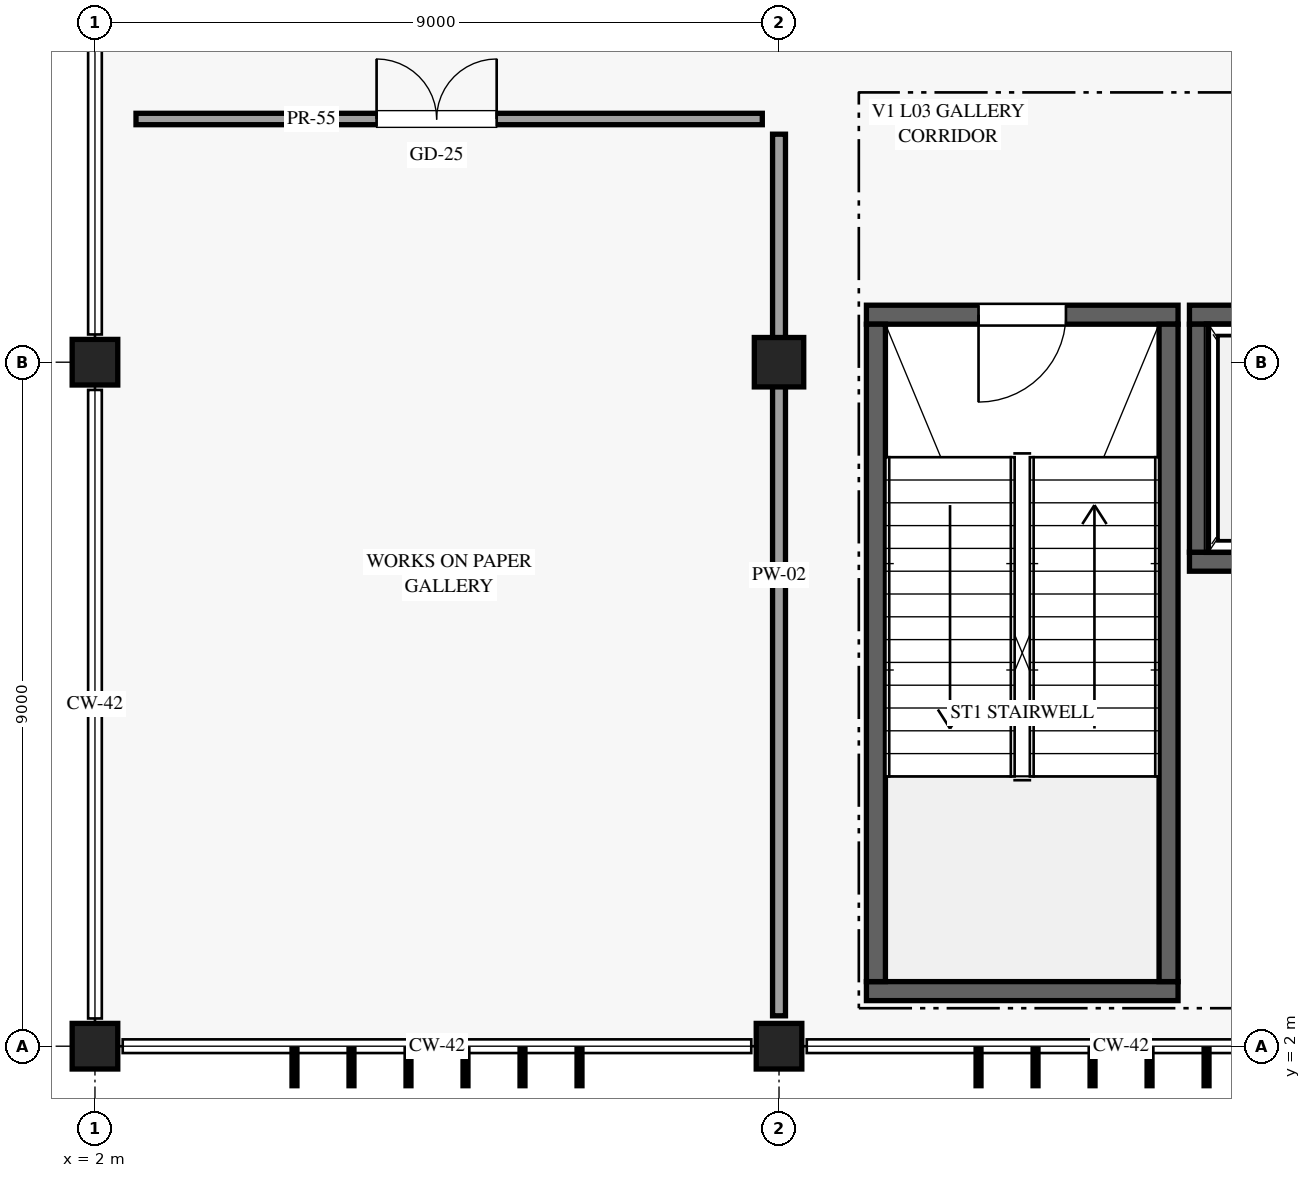
"""IFC4 building model, lengths in metres.
Left out: names, types, materials, properties, quantities, classifications, styles, units other than length and angle.
Written with IfcOpenShell. Run it as: python <this file> out.ifc"""

import sys

from ifc_helpers import new_model, si_unit, direction, frame, frame_2d, origin, origin_2d, place, context, subcontext, project, spatial, rectangle, circle, extrude, element, fill, save


model = new_model("IFC4")
c1 = context("Model", 3, precision=1e-05, world=origin(), true_north=direction((0.0, 1.0)))
c2 = subcontext(c1, "Body", "Model", "MODEL_VIEW")
j1 = project(units=[si_unit("LENGTHUNIT", "METRE"), si_unit("PLANEANGLEUNIT", "RADIAN")], contexts=[c1])
p1 = place(None, origin())
s1 = spatial("IfcSite", under=j1, at=p1, CompositionType="ELEMENT")
p2 = place(p1, origin())
s2 = spatial("IfcBuilding", under=s1, at=p2, CompositionType="ELEMENT")
p3 = place(p2, frame((0.0, 0.0, 15.0)))
s3 = spatial("IfcBuildingStorey", under=s2, at=p3, CompositionType="ELEMENT", Elevation=15.0)
for number, where, z_axis, x_axis in (
    (1, (2.0, 2.0, 0.0), (0.0, 0.0, 1.0), (1.0, 0.0, 0.0)),
    (2, (2.0, 11.0, 0.0), (0.0, 0.0, 1.0), (1.0, 0.0, 0.0)),
    (3, (11.0, 2.0, 0.0), (0.0, 0.0, 1.0), (1.0, 0.0, 0.0)),
):
    element("IfcColumn", number, at=place(p3, frame(where, z_axis=z_axis, x_axis=x_axis)), inside=s3, PredefinedType="COLUMN", context=c2, shape_type="SweptSolid", body=[
        extrude(rectangle(XDim=0.6, YDim=0.6, at=origin_2d()), origin(), (0.0, 0.0, 1.0), 4.5),
    ])
p4 = place(p3, frame((11.0, 11.0, 0.0), z_axis=(0.0, 0.0, 1.0), x_axis=(1.0, 0.0, 0.0)))
e4 = element("IfcColumn", 4, at=p4, inside=s3, PredefinedType="COLUMN", context=c2, shape_type="SweptSolid", body=[
    extrude(circle(Radius=0.325, at=origin_2d()), origin(), (0.0, 0.0, 1.0), 4.5),
])
p5 = place(p3, frame((12.15, 11.625, 0.0), z_axis=(0.0, 0.0, 1.0), x_axis=(1.0, 0.0, 0.0)))
e5 = element("IfcWall", 5, at=p5, inside=s3, PredefinedType="SHEAR", context=c2, shape_type="SweptSolid", body=[
    extrude(rectangle(XDim=4.1, YDim=0.25, at=frame_2d((2.05, 0.0))), origin(), (0.0, 0.0, 1.0), 4.18),
])
p6 = place(p5, frame((2.625, 0.0, 0.0), z_axis=(0.0, 0.0, 1.0), x_axis=(-1.0, 0.0, 0.0)))
e6 = element("IfcOpeningElement", 6, at=p6, cuts=e5, PredefinedType="OPENING", context=c2, shape_type="SweptSolid", body=[
    extrude(rectangle(XDim=1.15, YDim=2.2, at=frame_2d((0.575, 1.1))), frame((0.0, 0.135, 0.0), z_axis=(0.0, -1.0, 0.0), x_axis=(1.0, 0.0, 0.0)), (0.0, 0.0, 1.0), 0.27),
])
p7 = place(p3, frame((12.15, 2.725, 0.0), z_axis=(0.0, 0.0, 1.0), x_axis=(1.0, 0.0, 0.0)))
e7 = element("IfcWall", 7, at=p7, inside=s3, PredefinedType="SHEAR", context=c2, shape_type="SweptSolid", body=[
    extrude(rectangle(XDim=4.1, YDim=0.25, at=frame_2d((2.05, 0.0))), origin(), (0.0, 0.0, 1.0), 4.18),
])
for number, where, z_axis, x_axis in (
    (8, (12.275, 2.85, 0.0), (0.0, 0.0, 1.0), (0.0, 1.0, 0.0)),
    (9, (16.125, 2.85, 0.0), (0.0, 0.0, 1.0), (0.0, 1.0, 0.0)),
):
    element("IfcWall", number, at=place(p3, frame(where, z_axis=z_axis, x_axis=x_axis)), inside=s3, PredefinedType="SHEAR", context=c2, shape_type="SweptSolid", body=[
        extrude(rectangle(XDim=8.65, YDim=0.25, at=frame_2d((4.325, 0.0))), origin(), (0.0, 0.0, 1.0), 4.18),
    ])
p8 = place(p3, frame((16.4, 11.625, 0.0), z_axis=(0.0, 0.0, 1.0), x_axis=(1.0, 0.0, 0.0)))
e10 = element("IfcWall", 10, at=p8, inside=s3, PredefinedType="SHEAR", context=c2, shape_type="SweptSolid", body=[
    extrude(rectangle(XDim=2.5, YDim=0.25, at=frame_2d((1.25, 0.0))), origin(), (0.0, 0.0, 1.0), 4.18),
])
p9 = place(p8, frame((0.7, 0.0, 0.0)))
e11 = element("IfcOpeningElement", 11, at=p9, cuts=e10, PredefinedType="OPENING", context=c2, shape_type="SweptSolid", body=[
    extrude(rectangle(XDim=1.1, YDim=2.2, at=frame_2d((0.55, 1.1))), frame((0.0, 0.135, 0.0), z_axis=(0.0, -1.0, 0.0), x_axis=(1.0, 0.0, 0.0)), (0.0, 0.0, 1.0), 0.27),
])
p10 = place(p3, frame((16.4, 8.375, 0.0), z_axis=(0.0, 0.0, 1.0), x_axis=(1.0, 0.0, 0.0)))
e12 = element("IfcWall", 12, at=p10, inside=s3, PredefinedType="SHEAR", context=c2, shape_type="SweptSolid", body=[
    extrude(rectangle(XDim=2.5, YDim=0.25, at=frame_2d((1.25, 0.0))), origin(), (0.0, 0.0, 1.0), 4.18),
])
p11 = place(p3, frame((16.525, 8.5, 0.0), z_axis=(0.0, 0.0, 1.0), x_axis=(0.0, 1.0, 0.0)))
e13 = element("IfcWall", 13, at=p11, inside=s3, PredefinedType="SHEAR", context=c2, shape_type="SweptSolid", body=[
    extrude(rectangle(XDim=3.0, YDim=0.25, at=frame_2d((1.5, 0.0))), origin(), (0.0, 0.0, 1.0), 4.18),
])
p12 = place(p3, frame((2.54, 14.2, 0.0), z_axis=(0.0, 0.0, 1.0), x_axis=(1.0, 0.0, 0.0)))
e14 = element("IfcWall", 14, at=p12, inside=s3, PredefinedType="PARTITIONING", context=c2, shape_type="SweptSolid", body=[
    extrude(rectangle(XDim=8.24, YDim=0.15, at=frame_2d((4.12, 0.0))), origin(), (0.0, 0.0, 1.0), 3.575),
])
p13 = place(p12, frame((3.165, 0.0, 0.0)))
e15 = element("IfcOpeningElement", 15, at=p13, cuts=e14, PredefinedType="OPENING", context=c2, shape_type="SweptSolid", body=[
    extrude(rectangle(XDim=1.58, YDim=2.38, at=frame_2d((0.79, 1.19))), frame((0.0, 0.085, 0.0), z_axis=(0.0, -1.0, 0.0), x_axis=(1.0, 0.0, 0.0)), (0.0, 0.0, 1.0), 0.17),
])
p14 = place(p3, frame((11.0, 2.4, 0.0), z_axis=(0.0, 0.0, 1.0), x_axis=(0.0, 1.0, 0.0)))
e16 = element("IfcWall", 16, at=p14, inside=s3, PredefinedType="PARTITIONING", context=c2, shape_type="SweptSolid", body=[
    extrude(rectangle(XDim=11.6, YDim=0.17, at=frame_2d((5.8, 0.0))), origin(), (0.0, 0.0, 1.0), 3.575),
])
p15 = place(p6, origin())
e17 = element("IfcDoor", 17, at=p15, inside=s3, OperationType="SINGLE_SWING_RIGHT", PredefinedType="DOOR", context=c2, shape_type="SweptSolid", body=[
    extrude(rectangle(XDim=1.15, YDim=2.2, at=frame_2d((0.575, 1.1))), frame((0.0, 0.025, 0.0), z_axis=(0.0, -1.0, 0.0), x_axis=(1.0, 0.0, 0.0)), (0.0, 0.0, 1.0), 0.05),
])
fill(e6, e17)
p16 = place(p13, origin())
e18 = element("IfcDoor", 18, at=p16, inside=s3, OperationType="DOUBLE_DOOR_SINGLE_SWING", PredefinedType="DOOR", context=c2, shape_type="SweptSolid", body=[
    extrude(rectangle(XDim=1.58, YDim=2.38, at=frame_2d((0.79, 1.19))), frame((0.0, 0.025, 0.0), z_axis=(0.0, -1.0, 0.0), x_axis=(1.0, 0.0, 0.0)), (0.0, 0.0, 1.0), 0.05),
])
fill(e15, e18)
save(model, sys.argv[1])
